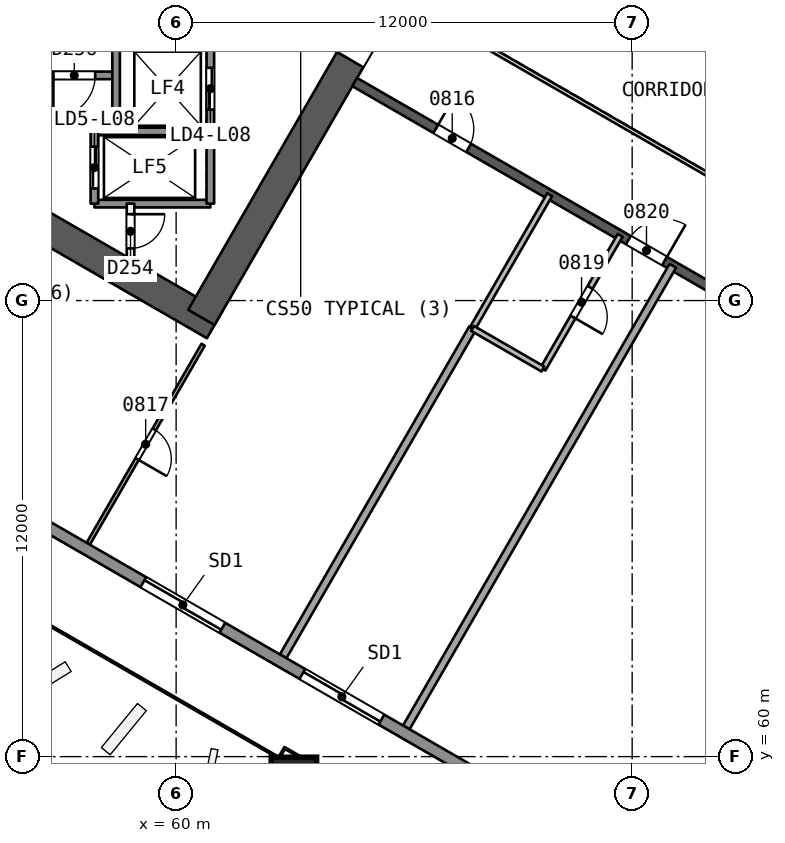
"""IFC4 building model, lengths in metres.
Left out: names, types, materials, properties, quantities, classifications, styles, units other than length and angle.
Written with IfcOpenShell. Run it as: python <this file> out.ifc"""

import sys

from ifc_helpers import new_model, si_unit, direction, frame, frame_2d, origin, origin_2d, place, context, subcontext, project, spatial, rectangle, extrude, element, fill, save


model = new_model("IFC4")
c1 = context("Model", 3, precision=1e-05, world=origin(), true_north=direction((0.0, 1.0)))
c2 = subcontext(c1, "Body", "Model", "MODEL_VIEW")
j1 = project(units=[si_unit("LENGTHUNIT", "METRE"), si_unit("PLANEANGLEUNIT", "RADIAN")], contexts=[c1])
p1 = place(None, origin())
s1 = spatial("IfcSite", under=j1, at=p1, CompositionType="ELEMENT")
p2 = place(p1, origin())
s2 = spatial("IfcBuilding", under=s1, at=p2, CompositionType="ELEMENT")
p3 = place(p2, frame((0.0, 0.0, 41.1)))
s3 = spatial("IfcBuildingStorey", under=s2, at=p3, CompositionType="ELEMENT", Elevation=41.1)
p4 = place(p3, frame((48.797, 78.408, 0.0), z_axis=(0.0, 0.0, 1.0), x_axis=(0.866032504327, -0.499987701298, 0.0)))
e1 = element("IfcWall", 1, at=p4, inside=s3, PredefinedType="SHEAR", context=c2, shape_type="SweptSolid", body=[
    extrude(rectangle(XDim=14.102, YDim=0.8, at=frame_2d((7.051, 0.0))), origin(), (0.0, 0.0, 1.0), 3.7),
])
p5 = place(p3, frame((60.664, 71.557, 0.0), z_axis=(0.0, 0.0, 1.0), x_axis=(0.50000409368, 0.866023040284, 0.0)))
e2 = element("IfcWall", 2, at=p5, inside=s3, PredefinedType="SHEAR", context=c2, shape_type="SweptSolid", body=[
    extrude(rectangle(XDim=9.98, YDim=0.8, at=frame_2d((4.99, 0.0))), origin(), (0.0, 0.0, 1.0), 3.7),
])
p6 = place(p5, frame((7.83, 0.0, 0.0)))
e3 = element("IfcOpeningElement", 3, at=p6, cuts=e2, PredefinedType="OPENING", context=c2, shape_type="SweptSolid", body=[
    extrude(rectangle(XDim=1.2, YDim=2.1, at=frame_2d((0.6, 1.05))), frame((0.0, 0.411, 0.0), z_axis=(0.0, -1.0, 0.0), x_axis=(1.0, 0.0, 0.0)), (0.0, 0.0, 1.0), 0.821),
])
p7 = place(p3, frame((64.7, 77.748, 0.0), z_axis=(0.0, 0.0, 1.0), x_axis=(0.866026492143, -0.499998114903, 0.0)))
e4 = element("IfcWall", 4, at=p7, inside=s3, PredefinedType="SHEAR", context=c2, shape_type="SweptSolid", body=[
    extrude(rectangle(XDim=15.588, YDim=0.25, at=frame_2d((7.794, 0.0))), origin(), (0.0, 0.0, 1.0), 3.2),
])
p8 = place(p7, frame((2.462, 0.0, 0.0)))
e5 = element("IfcOpeningElement", 5, at=p8, cuts=e4, PredefinedType="OPENING", context=c2, shape_type="SweptSolid", body=[
    extrude(rectangle(XDim=1.0, YDim=2.1, at=frame_2d((0.5, 1.05))), frame((0.0, 0.135, 0.0), z_axis=(0.0, -1.0, 0.0), x_axis=(1.0, 0.0, 0.0)), (0.0, 0.0, 1.0), 0.271),
])
p9 = place(p7, frame((8.315, 0.0, 0.0)))
e6 = element("IfcOpeningElement", 6, at=p9, cuts=e4, PredefinedType="OPENING", context=c2, shape_type="SweptSolid", body=[
    extrude(rectangle(XDim=1.1, YDim=2.1, at=frame_2d((0.55, 1.05))), frame((0.0, 0.135, 0.0), z_axis=(0.0, -1.0, 0.0), x_axis=(1.0, 0.0, 0.0)), (0.0, 0.0, 1.0), 0.271),
])
p10 = place(p7, frame((10.827, 0.0, 0.0)))
e7 = element("IfcOpeningElement", 7, at=p10, cuts=e4, PredefinedType="OPENING", context=c2, shape_type="SweptSolid", body=[
    extrude(rectangle(XDim=1.0, YDim=2.1, at=frame_2d((0.5, 1.05))), frame((0.0, 0.135, 0.0), z_axis=(0.0, -1.0, 0.0), x_axis=(1.0, 0.0, 0.0)), (0.0, 0.0, 1.0), 0.271),
])
p11 = place(p3, frame((63.087, 59.366, 0.0), z_axis=(0.010093620709, 0.017482414954, 0.999796221231), x_axis=(-0.499907122366, -0.865843723195, 0.020187025824)))
e8 = element("IfcColumn", 8, at=p11, inside=s3, PredefinedType="COLUMN", context=c2, shape_type="SweptSolid", body=[
    extrude(rectangle(XDim=1.2, YDim=1.2, at=origin_2d()), origin(), (0.0, 0.0, 1.0), 3.701),
])
p12 = place(p3, frame((60.71, 70.838, 0.0), z_axis=(0.0, 0.0, 1.0), x_axis=(-0.499985689571, -0.866033665757, 0.0)))
e9 = element("IfcWall", 9, at=p12, inside=s3, PredefinedType="PARTITIONING", context=c2, shape_type="SweptSolid", body=[
    extrude(rectangle(XDim=6.048, YDim=0.1, at=frame_2d((3.024, 0.0))), origin(), (0.0, 0.0, 1.0), 3.2),
])
p13 = place(p12, frame((2.574, 0.0, 0.0)))
e10 = element("IfcOpeningElement", 10, at=p13, cuts=e9, PredefinedType="OPENING", context=c2, shape_type="SweptSolid", body=[
    extrude(rectangle(XDim=0.9, YDim=2.1, at=frame_2d((0.45, 1.05))), frame((0.0, 0.061, 0.0), z_axis=(0.0, -1.0, 0.0), x_axis=(1.0, 0.0, 0.0)), (0.0, 0.0, 1.0), 0.121),
])
p14 = place(p3, frame((62.817, 62.639, 0.0), z_axis=(0.0, 0.0, 1.0), x_axis=(0.499984050028, 0.866034612309, 0.0)))
e11 = element("IfcWall", 11, at=p14, inside=s3, PredefinedType="PARTITIONING", context=c2, shape_type="SweptSolid", body=[
    extrude(rectangle(XDim=9.964, YDim=0.2, at=frame_2d((4.982, 0.0))), origin(), (0.0, 0.0, 1.0), 3.2),
])
p15 = place(p3, frame((67.798, 71.268, 0.0), z_axis=(0.0, 0.0, 1.0), x_axis=(0.500029316959, 0.866008476969, 0.0)))
e12 = element("IfcWall", 12, at=p15, inside=s3, PredefinedType="PARTITIONING", context=c2, shape_type="SweptSolid", body=[
    extrude(rectangle(XDim=4.063, YDim=0.15, at=frame_2d((2.032, 0.0))), origin(), (0.0, 0.0, 1.0), 3.2),
])
p16 = place(p3, frame((71.684, 73.716, 0.0), z_axis=(0.0, 0.0, 1.0), x_axis=(-0.500010271798, -0.866019473278, 0.0)))
e13 = element("IfcWall", 13, at=p16, inside=s3, PredefinedType="PARTITIONING", context=c2, shape_type="SweptSolid", body=[
    extrude(rectangle(XDim=4.063, YDim=0.15, at=frame_2d((2.031, 0.0))), origin(), (0.0, 0.0, 1.0), 3.2),
])
p17 = place(p16, frame((1.582, 0.0, 0.0)))
e14 = element("IfcOpeningElement", 14, at=p17, cuts=e13, PredefinedType="OPENING", context=c2, shape_type="SweptSolid", body=[
    extrude(rectangle(XDim=0.9, YDim=2.1, at=frame_2d((0.45, 1.05))), frame((0.0, 0.085, 0.0), z_axis=(0.0, -1.0, 0.0), x_axis=(1.0, 0.0, 0.0)), (0.0, 0.0, 1.0), 0.171),
])
p18 = place(p3, frame((69.653, 70.197, 0.0), z_axis=(0.0, 0.0, 1.0), x_axis=(-0.86605268637, 0.499952742198, 0.0)))
e15 = element("IfcWall", 15, at=p18, inside=s3, PredefinedType="PARTITIONING", context=c2, shape_type="SweptSolid", body=[
    extrude(rectangle(XDim=2.141, YDim=0.15, at=frame_2d((1.071, 0.0))), origin(), (0.0, 0.0, 1.0), 3.2),
])
p19 = place(p3, frame((66.057, 60.768, 0.0), z_axis=(0.0, 0.0, 1.0), x_axis=(0.499997162821, 0.866027041824, 0.0)))
e16 = element("IfcWall", 16, at=p19, inside=s3, PredefinedType="PARTITIONING", context=c2, shape_type="SweptSolid", body=[
    extrude(rectangle(XDim=14.027, YDim=0.2, at=frame_2d((7.013, 0.0))), origin(), (0.0, 0.0, 1.0), 3.2),
])
p20 = place(p3, frame((90.854, 46.28, 0.0), z_axis=(0.0, 0.0, 1.0), x_axis=(-0.866026630825, 0.499997874697, 0.0)))
e17 = element("IfcWall", 17, at=p20, inside=s3, PredefinedType="SOLIDWALL", context=c2, shape_type="SweptSolid", body=[
    extrude(rectangle(XDim=61.18, YDim=0.3, at=frame_2d((30.59, 0.0))), origin(), (0.0, 0.0, 1.0), 3.2),
])
p21 = place(p20, frame((29.39, 0.0, 0.0)))
e18 = element("IfcOpeningElement", 18, at=p21, cuts=e17, PredefinedType="OPENING", context=c2, shape_type="SweptSolid", body=[
    extrude(rectangle(XDim=2.4, YDim=2.4, at=frame_2d((1.2, 1.2))), frame((0.0, 0.161, 0.0), z_axis=(0.0, -1.0, 0.0), x_axis=(1.0, 0.0, 0.0)), (0.0, 0.0, 1.0), 0.321),
])
p22 = place(p20, frame((34.223, 0.0, 0.0)))
e19 = element("IfcOpeningElement", 19, at=p22, cuts=e17, PredefinedType="OPENING", context=c2, shape_type="SweptSolid", body=[
    extrude(rectangle(XDim=2.4, YDim=2.4, at=frame_2d((1.2, 1.2))), frame((0.0, 0.161, 0.0), z_axis=(0.0, -1.0, 0.0), x_axis=(1.0, 0.0, 0.0)), (0.0, 0.0, 1.0), 0.321),
])
p23 = place(p20, frame((47.439, 0.0, 0.0)))
e20 = element("IfcOpeningElement", 20, at=p23, cuts=e17, PredefinedType="OPENING", context=c2, shape_type="SweptSolid", body=[
    extrude(rectangle(XDim=2.4, YDim=2.4, at=frame_2d((1.2, 1.2))), frame((0.0, 0.161, 0.0), z_axis=(0.0, -1.0, 0.0), x_axis=(1.0, 0.0, 0.0)), (0.0, 0.0, 1.0), 0.321),
])
p24 = place(p20, frame((13.116, 0.0, 0.0)))
e21 = element("IfcOpeningElement", 21, at=p24, cuts=e17, PredefinedType="OPENING", context=c2, shape_type="SweptSolid", body=[
    extrude(rectangle(XDim=2.4, YDim=2.4, at=frame_2d((1.2, 1.2))), frame((0.0, 0.161, 0.0), z_axis=(0.0, -1.0, 0.0), x_axis=(1.0, 0.0, 0.0)), (0.0, 0.0, 1.0), 0.321),
])
p25 = place(p3, frame((58.42, 77.925, 0.0), z_axis=(0.0, 0.0, 1.0), x_axis=(-1.0, 0.0, 0.0)))
e22 = element("IfcWall", 22, at=p25, inside=s3, PredefinedType="SOLIDWALL", context=c2, shape_type="SweptSolid", body=[
    extrude(rectangle(XDim=7.7, YDim=0.2, at=frame_2d((3.85, 0.0))), origin(), (0.0, 0.0, 1.0), 3.2),
])
p26 = place(p25, frame((0.55, 0.0, 0.0)))
e23 = element("IfcOpeningElement", 23, at=p26, cuts=e22, PredefinedType="OPENING", context=c2, shape_type="SweptSolid", body=[
    extrude(rectangle(XDim=1.1, YDim=2.1, at=frame_2d((0.55, 1.05))), frame((0.0, 0.11, 0.0), z_axis=(0.0, -1.0, 0.0), x_axis=(1.0, 0.0, 0.0)), (0.0, 0.0, 1.0), 0.221),
])
for number, where, z_axis, x_axis in (
    (24, (60.9, 76.45, 0.0), (0.0, 0.0, 1.0), (-1.0, 0.0, 0.0)),
    (25, (60.9, 74.55, 0.0), (0.0, 0.0, 1.0), (-1.0, 0.0, 0.0)),
):
    element("IfcWall", number, at=place(p3, frame(where, z_axis=z_axis, x_axis=x_axis)), inside=s3, PredefinedType="SOLIDWALL", context=c2, shape_type="SweptSolid", body=[
        extrude(rectangle(XDim=3.05, YDim=0.2, at=frame_2d((1.525, 0.0))), origin(), (0.0, 0.0, 1.0), 3.2),
    ])
p27 = place(p3, frame((60.9, 85.45, 0.0), z_axis=(0.0, 0.0, 1.0), x_axis=(0.0, -1.0, 0.0)))
e26 = element("IfcWall", 26, at=p27, inside=s3, PredefinedType="SOLIDWALL", context=c2, shape_type="SweptSolid", body=[
    extrude(rectangle(XDim=10.9, YDim=0.2, at=frame_2d((5.45, 0.0))), origin(), (0.0, 0.0, 1.0), 3.2),
])
p28 = place(p27, frame((0.575, 0.0, 0.0)))
e27 = element("IfcOpeningElement", 27, at=p28, cuts=e26, PredefinedType="OPENING", context=c2, shape_type="SweptSolid", body=[
    extrude(rectangle(XDim=1.1, YDim=2.1, at=frame_2d((0.55, 1.05))), frame((0.0, 0.11, 0.0), z_axis=(0.0, -1.0, 0.0), x_axis=(1.0, 0.0, 0.0)), (0.0, 0.0, 1.0), 0.221),
])
p29 = place(p27, frame((2.825, 0.0, 0.0)))
e28 = element("IfcOpeningElement", 28, at=p29, cuts=e26, PredefinedType="OPENING", context=c2, shape_type="SweptSolid", body=[
    extrude(rectangle(XDim=1.1, YDim=2.1, at=frame_2d((0.55, 1.05))), frame((0.0, 0.11, 0.0), z_axis=(0.0, -1.0, 0.0), x_axis=(1.0, 0.0, 0.0)), (0.0, 0.0, 1.0), 0.221),
])
p30 = place(p27, frame((5.075, 0.0, 0.0)))
e29 = element("IfcOpeningElement", 29, at=p30, cuts=e26, PredefinedType="OPENING", context=c2, shape_type="SweptSolid", body=[
    extrude(rectangle(XDim=1.1, YDim=2.1, at=frame_2d((0.55, 1.05))), frame((0.0, 0.11, 0.0), z_axis=(0.0, -1.0, 0.0), x_axis=(1.0, 0.0, 0.0)), (0.0, 0.0, 1.0), 0.221),
])
p31 = place(p27, frame((7.325, 0.0, 0.0)))
e30 = element("IfcOpeningElement", 30, at=p31, cuts=e26, PredefinedType="OPENING", context=c2, shape_type="SweptSolid", body=[
    extrude(rectangle(XDim=1.1, YDim=2.1, at=frame_2d((0.55, 1.05))), frame((0.0, 0.11, 0.0), z_axis=(0.0, -1.0, 0.0), x_axis=(1.0, 0.0, 0.0)), (0.0, 0.0, 1.0), 0.221),
])
p32 = place(p3, frame((58.8, 74.55, 0.0), z_axis=(0.0, 0.0, 1.0), x_axis=(0.0, -1.0, 0.0)))
e31 = element("IfcWall", 31, at=p32, inside=s3, PredefinedType="PARTITIONING", context=c2, shape_type="SweptSolid", body=[
    extrude(rectangle(XDim=1.455, YDim=0.2, at=frame_2d((0.728, 0.0))), origin(), (0.0, 0.0, 1.0), 3.2),
])
p33 = place(p32, frame((0.278, 0.0, 0.0)))
e32 = element("IfcOpeningElement", 32, at=p33, cuts=e31, PredefinedType="OPENING", context=c2, shape_type="SweptSolid", body=[
    extrude(rectangle(XDim=0.9, YDim=2.1, at=frame_2d((0.45, 1.05))), frame((0.0, 0.11, 0.0), z_axis=(0.0, -1.0, 0.0), x_axis=(1.0, 0.0, 0.0)), (0.0, 0.0, 1.0), 0.221),
])
p34 = place(p3, frame((58.42, 85.45, 0.0), z_axis=(0.0, 0.0, 1.0), x_axis=(0.0, -1.0, 0.0)))
e33 = element("IfcWall", 33, at=p34, inside=s3, PredefinedType="SOLIDWALL", context=c2, shape_type="SweptSolid", body=[
    extrude(rectangle(XDim=9.0, YDim=0.2, at=frame_2d((4.5, 0.0))), origin(), (0.0, 0.0, 1.0), 3.2),
])
p35 = place(p3, frame((57.85, 76.45, 0.0), z_axis=(0.0, 0.0, 1.0), x_axis=(0.0, -1.0, 0.0)))
e34 = element("IfcWall", 34, at=p35, inside=s3, PredefinedType="SOLIDWALL", context=c2, shape_type="SweptSolid", body=[
    extrude(rectangle(XDim=1.9, YDim=0.2, at=frame_2d((0.95, 0.0))), origin(), (0.0, 0.0, 1.0), 3.2),
])
p36 = place(p35, frame((0.4, 0.0, 0.0)))
e35 = element("IfcOpeningElement", 35, at=p36, cuts=e34, PredefinedType="OPENING", context=c2, shape_type="SweptSolid", body=[
    extrude(rectangle(XDim=1.1, YDim=2.1, at=frame_2d((0.55, 1.05))), frame((0.0, 0.11, 0.0), z_axis=(0.0, -1.0, 0.0), x_axis=(1.0, 0.0, 0.0)), (0.0, 0.0, 1.0), 0.221),
])
p37 = place(p3, frame((67.702, 78.948, 0.0), z_axis=(0.0, 0.0, 1.0), x_axis=(0.866026658274, -0.499997827154, 0.0)))
e36 = element("IfcWall", 36, at=p37, inside=s3, PredefinedType="PARTITIONING", context=c2, shape_type="SweptSolid", body=[
    extrude(rectangle(XDim=11.588, YDim=0.1, at=frame_2d((5.794, 0.0))), origin(), (0.0, 0.0, 1.0), 3.2),
])
p38 = place(p8, origin())
e37 = element("IfcDoor", 37, at=p38, inside=s3, OperationType="SINGLE_SWING_LEFT", PredefinedType="NOTDEFINED", context=c2, shape_type="SweptSolid", body=[
    extrude(rectangle(XDim=1.0, YDim=2.1, at=frame_2d((0.5, 1.05))), frame((0.0, 0.025, 0.0), z_axis=(0.0, -1.0, 0.0), x_axis=(1.0, 0.0, 0.0)), (0.0, 0.0, 1.0), 0.05),
])
fill(e5, e37)
p39 = place(p13, origin())
e38 = element("IfcDoor", 38, at=p39, inside=s3, OperationType="SINGLE_SWING_RIGHT", PredefinedType="NOTDEFINED", context=c2, shape_type="SweptSolid", body=[
    extrude(rectangle(XDim=0.9, YDim=2.1, at=frame_2d((0.45, 1.05))), frame((0.0, 0.025, 0.0), z_axis=(0.0, -1.0, 0.0), x_axis=(1.0, 0.0, 0.0)), (0.0, 0.0, 1.0), 0.05),
])
fill(e10, e38)
p40 = place(p17, origin())
e39 = element("IfcDoor", 39, at=p40, inside=s3, OperationType="SINGLE_SWING_RIGHT", PredefinedType="NOTDEFINED", context=c2, shape_type="SweptSolid", body=[
    extrude(rectangle(XDim=0.9, YDim=2.1, at=frame_2d((0.45, 1.05))), frame((0.0, 0.025, 0.0), z_axis=(0.0, -1.0, 0.0), x_axis=(1.0, 0.0, 0.0)), (0.0, 0.0, 1.0), 0.05),
])
fill(e14, e39)
p41 = place(p9, origin())
e40 = element("IfcDoor", 40, at=p41, inside=s3, OperationType="SINGLE_SWING_RIGHT", PredefinedType="NOTDEFINED", context=c2, shape_type="SweptSolid", body=[
    extrude(rectangle(XDim=1.1, YDim=2.1, at=frame_2d((0.55, 1.05))), frame((0.0, 0.025, 0.0), z_axis=(0.0, -1.0, 0.0), x_axis=(1.0, 0.0, 0.0)), (0.0, 0.0, 1.0), 0.05),
])
fill(e6, e40)
p42 = place(p21, origin())
e41 = element("IfcDoor", 41, at=p42, inside=s3, OperationType="SLIDING_TO_LEFT", PredefinedType="NOTDEFINED", context=c2, shape_type="SweptSolid", body=[
    extrude(rectangle(XDim=2.4, YDim=2.4, at=frame_2d((1.2, 1.2))), frame((0.0, 0.025, 0.0), z_axis=(0.0, -1.0, 0.0), x_axis=(1.0, 0.0, 0.0)), (0.0, 0.0, 1.0), 0.05),
])
fill(e18, e41)
p43 = place(p22, origin())
e42 = element("IfcDoor", 42, at=p43, inside=s3, OperationType="SLIDING_TO_RIGHT", PredefinedType="NOTDEFINED", context=c2, shape_type="SweptSolid", body=[
    extrude(rectangle(XDim=2.4, YDim=2.4, at=frame_2d((1.2, 1.2))), frame((0.0, 0.025, 0.0), z_axis=(0.0, -1.0, 0.0), x_axis=(1.0, 0.0, 0.0)), (0.0, 0.0, 1.0), 0.05),
])
fill(e19, e42)
p44 = place(p6, origin())
e43 = element("IfcDoor", 43, at=p44, inside=s3, OperationType="SINGLE_SWING_LEFT", PredefinedType="NOTDEFINED", context=c2, shape_type="SweptSolid", body=[
    extrude(rectangle(XDim=1.2, YDim=2.1, at=frame_2d((0.6, 1.05))), frame((0.0, 0.025, 0.0), z_axis=(0.0, -1.0, 0.0), x_axis=(1.0, 0.0, 0.0)), (0.0, 0.0, 1.0), 0.05),
])
fill(e3, e43)
p45 = place(p31, origin())
e44 = element("IfcDoor", 44, at=p45, inside=s3, OperationType="SLIDING_TO_LEFT", PredefinedType="NOTDEFINED", context=c2, shape_type="SweptSolid", body=[
    extrude(rectangle(XDim=1.1, YDim=2.1, at=frame_2d((0.55, 1.05))), frame((0.0, 0.025, 0.0), z_axis=(0.0, -1.0, 0.0), x_axis=(1.0, 0.0, 0.0)), (0.0, 0.0, 1.0), 0.05),
])
fill(e30, e44)
p46 = place(p36, origin())
e45 = element("IfcDoor", 45, at=p46, inside=s3, OperationType="SLIDING_TO_RIGHT", PredefinedType="NOTDEFINED", context=c2, shape_type="SweptSolid", body=[
    extrude(rectangle(XDim=1.1, YDim=2.1, at=frame_2d((0.55, 1.05))), frame((0.0, 0.025, 0.0), z_axis=(0.0, -1.0, 0.0), x_axis=(1.0, 0.0, 0.0)), (0.0, 0.0, 1.0), 0.05),
])
fill(e35, e45)
p47 = place(p33, origin())
e46 = element("IfcDoor", 46, at=p47, inside=s3, OperationType="SINGLE_SWING_LEFT", PredefinedType="NOTDEFINED", context=c2, shape_type="SweptSolid", body=[
    extrude(rectangle(XDim=0.9, YDim=2.1, at=frame_2d((0.45, 1.05))), frame((0.0, 0.025, 0.0), z_axis=(0.0, -1.0, 0.0), x_axis=(1.0, 0.0, 0.0)), (0.0, 0.0, 1.0), 0.05),
])
fill(e32, e46)
p48 = place(p26, origin())
e47 = element("IfcDoor", 47, at=p48, inside=s3, OperationType="SINGLE_SWING_RIGHT", PredefinedType="NOTDEFINED", context=c2, shape_type="SweptSolid", body=[
    extrude(rectangle(XDim=1.1, YDim=2.1, at=frame_2d((0.55, 1.05))), frame((0.0, 0.025, 0.0), z_axis=(0.0, -1.0, 0.0), x_axis=(1.0, 0.0, 0.0)), (0.0, 0.0, 1.0), 0.05),
])
fill(e23, e47)
save(model, sys.argv[1])
